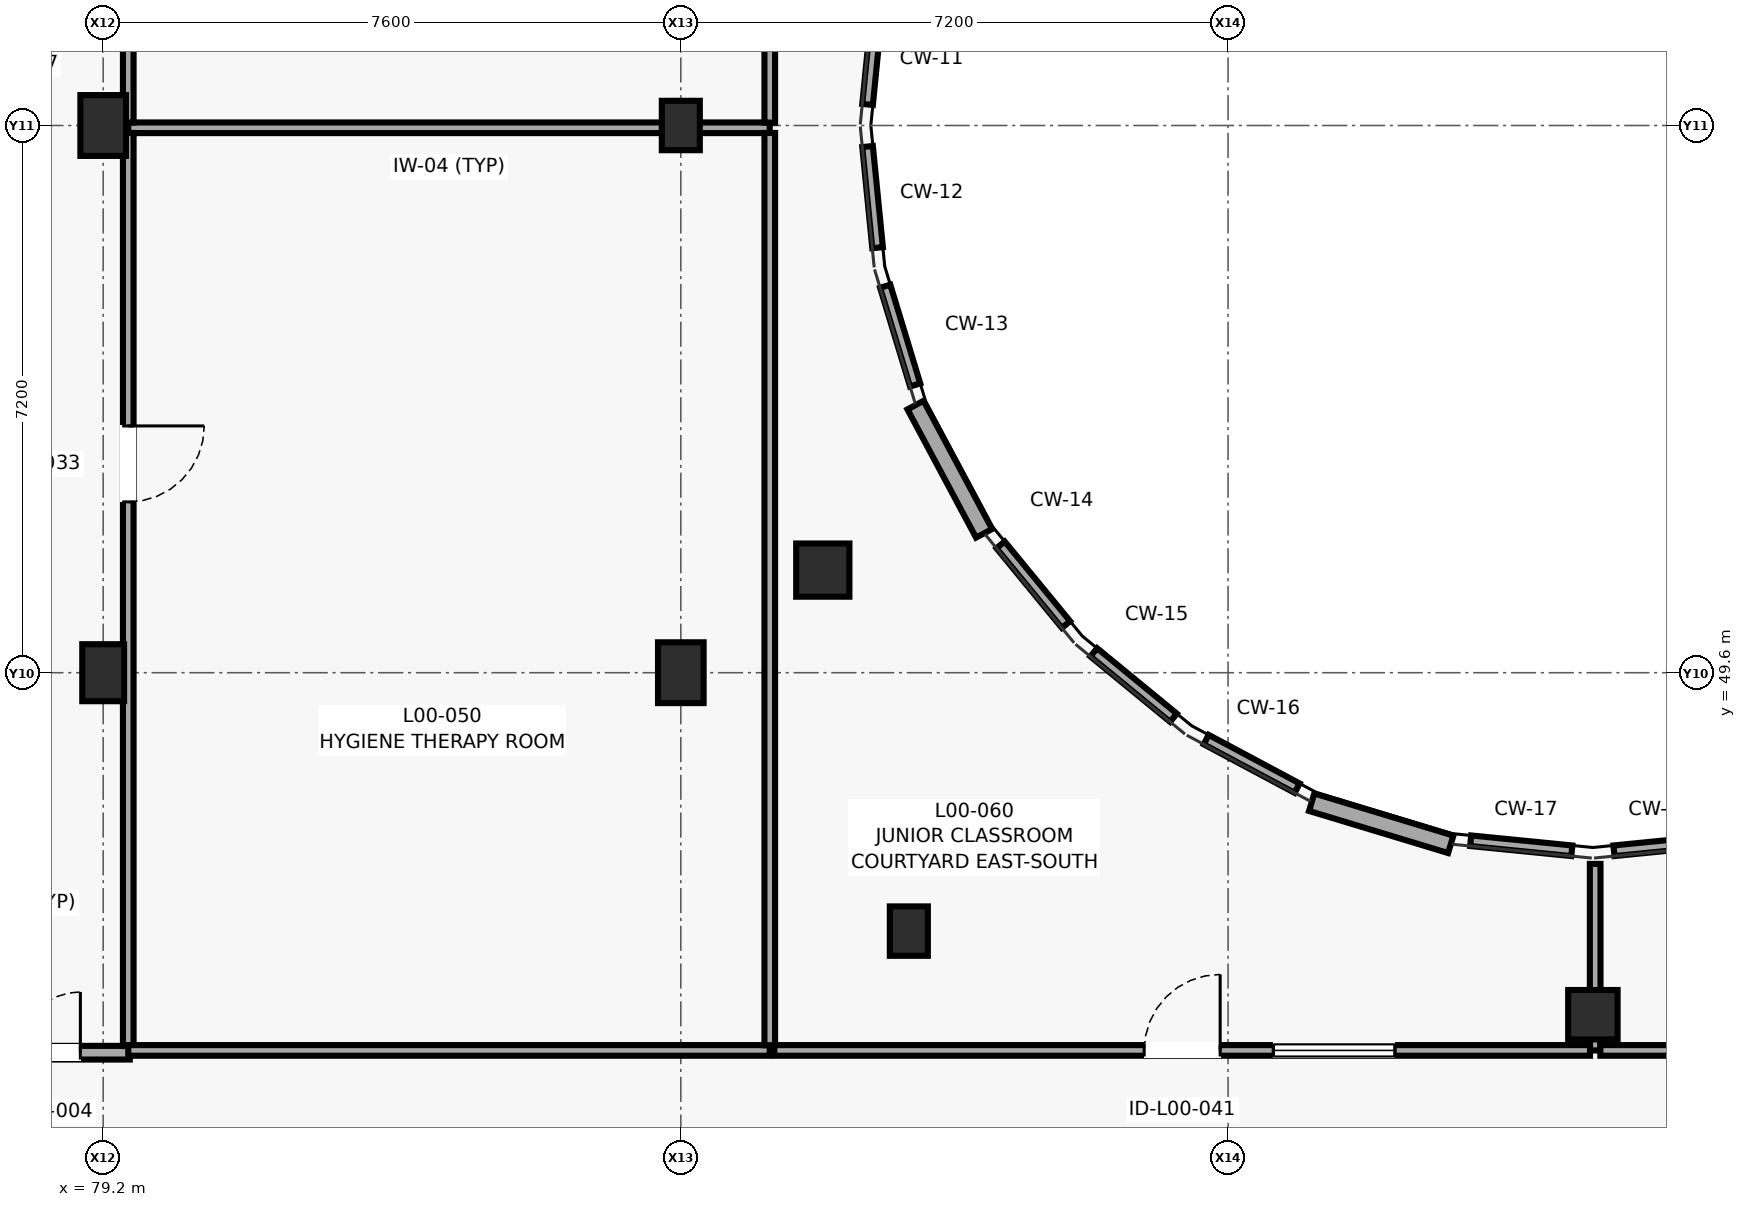
"""IFC4 building model, lengths in metres.
Left out: names, types, materials, properties, quantities, classifications, styles, units other than length and angle.
Written with IfcOpenShell. Run it as: python <this file> out.ifc"""

import sys

from ifc_helpers import new_model, si_unit, direction, frame, frame_2d, origin, origin_2d, place, context, subcontext, project, spatial, rectangle, circle, extrude, element, fill, save


model = new_model("IFC4")
c1 = context("Model", 3, precision=1e-05, world=origin(), true_north=direction((0.0, 1.0)))
c2 = subcontext(c1, "Body", "Model", "MODEL_VIEW")
j1 = project(units=[si_unit("LENGTHUNIT", "METRE"), si_unit("PLANEANGLEUNIT", "RADIAN")], contexts=[c1])
p1 = place(None, origin())
s1 = spatial("IfcSite", under=j1, at=p1, CompositionType="ELEMENT")
p2 = place(p1, origin())
s2 = spatial("IfcBuilding", under=s1, at=p2, CompositionType="ELEMENT")
p3 = place(p2, origin())
s3 = spatial("IfcBuildingStorey", under=s2, at=p3, CompositionType="ELEMENT", Elevation=0.0)
p4 = place(p3, frame((79.2, 49.6, 0.0), z_axis=(0.0, 0.0, 1.0), x_axis=(1.0, 0.0, 0.0)))
e1 = element("IfcColumn", 1, at=p4, inside=s3, PredefinedType="COLUMN", context=c2, shape_type="SweptSolid", body=[
    extrude(rectangle(XDim=0.55, YDim=0.75, at=origin_2d()), origin(), (0.0, 0.0, 1.0), 4.2),
])
for number, where, z_axis, x_axis in (
    (2, (79.2, 56.8, 0.0), (0.0, 0.0, 1.0), (1.0, 0.0, 0.0)),
    (3, (86.8, 49.6, 0.0), (0.0, 0.0, 1.0), (1.0, 0.0, 0.0)),
):
    element("IfcColumn", number, at=place(p3, frame(where, z_axis=z_axis, x_axis=x_axis)), inside=s3, PredefinedType="COLUMN", context=c2, shape_type="SweptSolid", body=[
        extrude(rectangle(XDim=0.6, YDim=0.8, at=origin_2d()), origin(), (0.0, 0.0, 1.0), 4.2),
    ])
p5 = place(p3, frame((86.8, 56.8, 0.0), z_axis=(0.0, 0.0, 1.0), x_axis=(1.0, 0.0, 0.0)))
e4 = element("IfcColumn", 4, at=p5, inside=s3, PredefinedType="COLUMN", context=c2, shape_type="SweptSolid", body=[
    extrude(rectangle(XDim=0.5, YDim=0.65, at=origin_2d()), origin(), (0.0, 0.0, 1.0), 4.2),
])
p6 = place(p3, frame((88.668, 50.95, 0.0), z_axis=(0.0, 0.0, 1.0), x_axis=(1.0, 0.0, 0.0)))
e5 = element("IfcColumn", 5, at=p6, inside=s3, PredefinedType="COLUMN", context=c2, shape_type="SweptSolid", body=[
    extrude(circle(Radius=0.35, at=origin_2d()), origin(), (0.0, 0.0, 1.0), 4.2),
])
p7 = place(p3, frame((89.8, 46.2, 0.0), z_axis=(0.0, 0.0, 1.0), x_axis=(1.0, 0.0, 0.0)))
e6 = element("IfcColumn", 6, at=p7, inside=s3, PredefinedType="COLUMN", context=c2, shape_type="SweptSolid", body=[
    extrude(rectangle(XDim=0.5, YDim=0.65, at=origin_2d()), origin(), (0.0, 0.0, 1.0), 4.2),
])
p8 = place(p3, frame((98.8, 45.1, 0.0), z_axis=(0.0, 0.0, 1.0), x_axis=(1.0, 0.0, 0.0)))
e7 = element("IfcColumn", 7, at=p8, inside=s3, PredefinedType="COLUMN", context=c2, shape_type="SweptSolid", body=[
    extrude(circle(Radius=0.325, at=origin_2d()), origin(), (0.0, 0.0, 1.0), 4.2),
])
p9 = place(p3, frame((89.888, 53.121, 0.0), z_axis=(0.0, 0.0, 1.0), x_axis=(0.471548403175, -0.881840180227, 0.0)))
e8 = element("IfcWall", 8, at=p9, inside=s3, PredefinedType="SOLIDWALL", context=c2, shape_type="SweptSolid", body=[
    extrude(rectangle(XDim=1.913, YDim=0.24, at=frame_2d((0.957, 0.0))), origin(), (0.0, 0.0, 1.0), 3.98),
])
p10 = place(p3, frame((95.1, 47.896, 0.0), z_axis=(0.0, 0.0, 1.0), x_axis=(0.957102771605, -0.289748657608, 0.0)))
e9 = element("IfcWall", 9, at=p10, inside=s3, PredefinedType="SOLIDWALL", context=c2, shape_type="SweptSolid", body=[
    extrude(rectangle(XDim=1.912, YDim=0.24, at=frame_2d((0.956, 0.0))), origin(), (0.0, 0.0, 1.0), 3.98),
])
p11 = place(p3, frame((76.65, 44.6, 0.0), z_axis=(0.0, 0.0, 1.0), x_axis=(1.0, 0.0, 0.0)))
e10 = element("IfcWall", 10, at=p11, inside=s3, PredefinedType="PARTITIONING", context=c2, shape_type="SweptSolid", body=[
    extrude(rectangle(XDim=2.9, YDim=0.18, at=frame_2d((1.45, 0.0))), origin(), (0.0, 0.0, 1.0), 3.98),
])
p12 = place(p11, frame((0.65, 0.0, 0.0)))
e11 = element("IfcOpeningElement", 11, at=p12, cuts=e10, PredefinedType="OPENING", context=c2, shape_type="SweptSolid", body=[
    extrude(rectangle(XDim=1.6, YDim=2.25, at=frame_2d((0.8, 1.125))), frame((0.0, 0.1, 0.0), z_axis=(0.0, -1.0, 0.0), x_axis=(1.0, 0.0, 0.0)), (0.0, 0.0, 1.0), 0.2),
])
p13 = place(p3, frame((87.97, 56.77, 0.0), z_axis=(0.0, 0.0, 1.0), x_axis=(-1.0, 0.0, 0.0)))
e12 = element("IfcWall", 12, at=p13, inside=s3, PredefinedType="PARTITIONING", context=c2, shape_type="SweptSolid", body=[
    extrude(rectangle(XDim=8.44, YDim=0.14, at=frame_2d((4.22, 0.0))), origin(), (0.0, 0.0, 1.0), 3.225),
])
p14 = place(p3, frame((79.53, 56.702, 0.0), z_axis=(0.0, 0.0, 1.0), x_axis=(0.0, -1.0, 0.0)))
e13 = element("IfcWall", 13, at=p14, inside=s3, PredefinedType="PARTITIONING", context=c2, shape_type="SweptSolid", body=[
    extrude(rectangle(XDim=12.014, YDim=0.14, at=frame_2d((6.007, 0.0))), origin(), (0.0, 0.0, 1.0), 3.975),
])
p15 = place(p14, frame((3.855, 0.0, 0.0)))
e14 = element("IfcOpeningElement", 14, at=p15, cuts=e13, PredefinedType="OPENING", context=c2, shape_type="SweptSolid", body=[
    extrude(rectangle(XDim=1.0, YDim=2.1, at=frame_2d((0.5, 1.05))), frame((0.0, 0.08, 0.0), z_axis=(0.0, -1.0, 0.0), x_axis=(1.0, 0.0, 0.0)), (0.0, 0.0, 1.0), 0.16),
])
p16 = place(p3, frame((79.53, 44.63, 0.0), z_axis=(0.0, 0.0, 1.0), x_axis=(1.0, 0.0, 0.0)))
e15 = element("IfcWall", 15, at=p16, inside=s3, PredefinedType="PARTITIONING", context=c2, shape_type="SweptSolid", body=[
    extrude(rectangle(XDim=8.44, YDim=0.14, at=frame_2d((4.22, 0.0))), origin(), (0.0, 0.0, 1.0), 3.975),
])
p17 = place(p3, frame((87.97, 44.698, 0.0), z_axis=(0.0, 0.0, 1.0), x_axis=(0.0, 1.0, 0.0)))
e16 = element("IfcWall", 16, at=p17, inside=s3, PredefinedType="PARTITIONING", context=c2, shape_type="SweptSolid", body=[
    extrude(rectangle(XDim=12.004, YDim=0.14, at=frame_2d((6.002, 0.0))), origin(), (0.0, 0.0, 1.0), 3.975),
])
p18 = place(p3, frame((87.97, 56.838, 0.0), z_axis=(0.0, 0.0, 1.0), x_axis=(0.0, 1.0, 0.0)))
e17 = element("IfcWall", 17, at=p18, inside=s3, PredefinedType="PARTITIONING", context=c2, shape_type="SweptSolid", body=[
    extrude(rectangle(XDim=12.132, YDim=0.14, at=frame_2d((6.066, 0.0))), origin(), (0.0, 0.0, 1.0), 3.975),
])
p19 = place(p3, frame((79.53, 68.902, 0.0), z_axis=(0.0, 0.0, 1.0), x_axis=(0.0, -1.0, 0.0)))
e18 = element("IfcWall", 18, at=p19, inside=s3, PredefinedType="PARTITIONING", context=c2, shape_type="SweptSolid", body=[
    extrude(rectangle(XDim=12.064, YDim=0.14, at=frame_2d((6.032, 0.0))), origin(), (0.0, 0.0, 1.0), 3.975),
])
p20 = place(p19, frame((5.482, 0.0, 0.0)))
e19 = element("IfcOpeningElement", 19, at=p20, cuts=e18, PredefinedType="OPENING", context=c2, shape_type="SweptSolid", body=[
    extrude(rectangle(XDim=1.1, YDim=2.1, at=frame_2d((0.55, 1.05))), frame((0.0, 0.08, 0.0), z_axis=(0.0, -1.0, 0.0), x_axis=(1.0, 0.0, 0.0)), (0.0, 0.0, 1.0), 0.16),
])
p21 = place(p19, frame((7.282, 0.0, 1.05)))
e20 = element("IfcOpeningElement", 20, at=p21, cuts=e18, PredefinedType="OPENING", context=c2, shape_type="SweptSolid", body=[
    extrude(rectangle(XDim=1.4, YDim=1.05, at=frame_2d((0.7, 0.525))), frame((0.0, 0.08, 0.0), z_axis=(0.0, -1.0, 0.0), x_axis=(1.0, 0.0, 0.0)), (0.0, 0.0, 1.0), 0.16),
])
p22 = place(p3, frame((100.408, 47.389, 0.0), z_axis=(0.0, 0.0, 1.0), x_axis=(-0.99513072014, -0.098563937798, 0.0)))
e21 = element("IfcWall", 21, at=p22, inside=s3, PredefinedType="PARTITIONING", context=c2, shape_type="SweptSolid", body=[
    extrude(rectangle(XDim=1.338, YDim=0.14, at=frame_2d((0.669, 0.0))), origin(), (0.0, 0.0, 1.0), 3.975),
])
p23 = place(p3, frame((98.83, 47.084, 0.0), z_axis=(0.0, 0.0, 1.0), x_axis=(0.0, -1.0, 0.0)))
e22 = element("IfcWall", 22, at=p23, inside=s3, PredefinedType="PARTITIONING", context=c2, shape_type="SweptSolid", body=[
    extrude(rectangle(XDim=2.454, YDim=0.14, at=frame_2d((1.227, 0.0))), origin(), (0.0, 0.0, 1.0), 3.975),
])
p24 = place(p3, frame((98.898, 44.63, 0.0), z_axis=(0.0, 0.0, 1.0), x_axis=(1.0, 0.0, 0.0)))
e23 = element("IfcWall", 23, at=p24, inside=s3, PredefinedType="PARTITIONING", context=c2, shape_type="SweptSolid", body=[
    extrude(rectangle(XDim=8.939, YDim=0.14, at=frame_2d((4.469, 0.0))), origin(), (0.0, 0.0, 1.0), 3.975),
])
p25 = place(p24, frame((3.97, 0.0, 0.0)))
e24 = element("IfcOpeningElement", 24, at=p25, cuts=e23, PredefinedType="OPENING", context=c2, shape_type="SweptSolid", body=[
    extrude(rectangle(XDim=1.0, YDim=2.1, at=frame_2d((0.5, 1.05))), frame((0.0, 0.08, 0.0), z_axis=(0.0, -1.0, 0.0), x_axis=(1.0, 0.0, 0.0)), (0.0, 0.0, 1.0), 0.16),
])
p26 = place(p24, frame((5.67, 0.0, 1.05)))
e25 = element("IfcOpeningElement", 25, at=p26, cuts=e23, PredefinedType="OPENING", context=c2, shape_type="SweptSolid", body=[
    extrude(rectangle(XDim=1.8, YDim=1.2, at=frame_2d((0.9, 0.6))), frame((0.0, 0.08, 0.0), z_axis=(0.0, -1.0, 0.0), x_axis=(1.0, 0.0, 0.0)), (0.0, 0.0, 1.0), 0.16),
])
p27 = place(p3, frame((89.883, 53.386, 0.0), z_axis=(0.0, 0.0, 1.0), x_axis=(-0.290266939661, 0.956945716193, 0.0)))
e26 = element("IfcWall", 26, at=p27, inside=s3, PredefinedType="PARTITIONING", context=c2, shape_type="SweptSolid", body=[
    extrude(rectangle(XDim=1.357, YDim=0.14, at=frame_2d((0.679, 0.0))), origin(), (0.0, 0.0, 1.0), 3.975),
])
p28 = place(p3, frame((89.389, 55.192, 0.0), z_axis=(0.0, 0.0, 1.0), x_axis=(-0.098563937798, 0.99513072014, 0.0)))
e27 = element("IfcWall", 27, at=p28, inside=s3, PredefinedType="PARTITIONING", context=c2, shape_type="SweptSolid", body=[
    extrude(rectangle(XDim=1.338, YDim=0.14, at=frame_2d((0.669, 0.0))), origin(), (0.0, 0.0, 1.0), 3.975),
])
p29 = place(p3, frame((88.03, 44.63, 0.0), z_axis=(0.0, 0.0, 1.0), x_axis=(1.0, 0.0, 0.0)))
e28 = element("IfcWall", 28, at=p29, inside=s3, PredefinedType="PARTITIONING", context=c2, shape_type="SweptSolid", body=[
    extrude(rectangle(XDim=10.732, YDim=0.14, at=frame_2d((5.366, 0.0))), origin(), (0.0, 0.0, 1.0), 3.975),
])
p30 = place(p29, frame((4.866, 0.0, 0.0)))
e29 = element("IfcOpeningElement", 29, at=p30, cuts=e28, PredefinedType="OPENING", context=c2, shape_type="SweptSolid", body=[
    extrude(rectangle(XDim=1.0, YDim=2.1, at=frame_2d((0.5, 1.05))), frame((0.0, 0.08, 0.0), z_axis=(0.0, -1.0, 0.0), x_axis=(1.0, 0.0, 0.0)), (0.0, 0.0, 1.0), 0.16),
])
p31 = place(p29, frame((6.566, 0.0, 1.05)))
e30 = element("IfcOpeningElement", 30, at=p31, cuts=e28, PredefinedType="OPENING", context=c2, shape_type="SweptSolid", body=[
    extrude(rectangle(XDim=1.6, YDim=1.1, at=frame_2d((0.8, 0.55))), frame((0.0, 0.08, 0.0), z_axis=(0.0, -1.0, 0.0), x_axis=(1.0, 0.0, 0.0)), (0.0, 0.0, 1.0), 0.16),
])
p32 = place(p3, frame((98.523, 47.257, 0.0), z_axis=(0.0, 0.0, 1.0), x_axis=(-0.99513072014, 0.098563937798, 0.0)))
e31 = element("IfcWall", 31, at=p32, inside=s3, PredefinedType="PARTITIONING", context=c2, shape_type="SweptSolid", body=[
    extrude(rectangle(XDim=1.338, YDim=0.14, at=frame_2d((0.669, 0.0))), origin(), (0.0, 0.0, 1.0), 3.975),
])
for number, where, z_axis, x_axis in (
    (32, (94.909, 48.081, 0.0), (0.0, 0.0, 1.0), (-0.882, 0.471, 0.0)),
    (33, (93.282, 49.007, 0.0), (0.0, 0.0, 1.0), (-0.773, 0.634, 0.0)),
    (34, (91.868, 50.233, 0.0), (0.0, 0.0, 1.0), (-0.634, 0.773, 0.0)),
):
    element("IfcWall", number, at=place(p3, frame(where, z_axis=z_axis, x_axis=x_axis)), inside=s3, PredefinedType="PARTITIONING", context=c2, shape_type="SweptSolid", body=[
        extrude(rectangle(XDim=1.357, YDim=0.14, at=frame_2d((0.678, 0.0))), origin(), (0.0, 0.0, 1.0), 3.975),
    ])
p33 = place(p3, frame((89.257, 57.077, 0.0), z_axis=(0.0, 0.0, 1.0), x_axis=(0.098563937798, 0.99513072014, 0.0)))
e35 = element("IfcWall", 35, at=p33, inside=s3, PredefinedType="PARTITIONING", context=c2, shape_type="SweptSolid", body=[
    extrude(rectangle(XDim=1.338, YDim=0.14, at=frame_2d((0.669, 0.0))), origin(), (0.0, 0.0, 1.0), 3.975),
])
p34 = place(p12, origin())
e36 = element("IfcDoor", 36, at=p34, inside=s3, OperationType="DOUBLE_DOOR_SINGLE_SWING", PredefinedType="DOOR", context=c2, shape_type="SweptSolid", body=[
    extrude(rectangle(XDim=1.6, YDim=2.25, at=frame_2d((0.8, 1.125))), frame((0.0, 0.025, 0.0), z_axis=(0.0, -1.0, 0.0), x_axis=(1.0, 0.0, 0.0)), (0.0, 0.0, 1.0), 0.05),
])
fill(e11, e36)
p35 = place(p15, origin())
e37 = element("IfcDoor", 37, at=p35, inside=s3, OperationType="SINGLE_SWING_LEFT", PredefinedType="DOOR", context=c2, shape_type="SweptSolid", body=[
    extrude(rectangle(XDim=1.0, YDim=2.1, at=frame_2d((0.5, 1.05))), frame((0.0, 0.025, 0.0), z_axis=(0.0, -1.0, 0.0), x_axis=(1.0, 0.0, 0.0)), (0.0, 0.0, 1.0), 0.05),
])
fill(e14, e37)
p36 = place(p30, origin())
e38 = element("IfcDoor", 38, at=p36, inside=s3, OperationType="SINGLE_SWING_RIGHT", PredefinedType="DOOR", context=c2, shape_type="SweptSolid", body=[
    extrude(rectangle(XDim=1.0, YDim=2.1, at=frame_2d((0.5, 1.05))), frame((0.0, 0.025, 0.0), z_axis=(0.0, -1.0, 0.0), x_axis=(1.0, 0.0, 0.0)), (0.0, 0.0, 1.0), 0.05),
])
fill(e29, e38)
p37 = place(p31, origin())
e39 = element("IfcWindow", 39, at=p37, inside=s3, PartitioningType="SINGLE_PANEL", PredefinedType="WINDOW", context=c2, shape_type="SweptSolid", body=[
    extrude(rectangle(XDim=1.6, YDim=1.1, at=frame_2d((0.8, 0.55))), frame((0.0, 0.03, 0.0), z_axis=(0.0, -1.0, 0.0), x_axis=(1.0, 0.0, 0.0)), (0.0, 0.0, 1.0), 0.06),
])
fill(e30, e39)
save(model, sys.argv[1])
